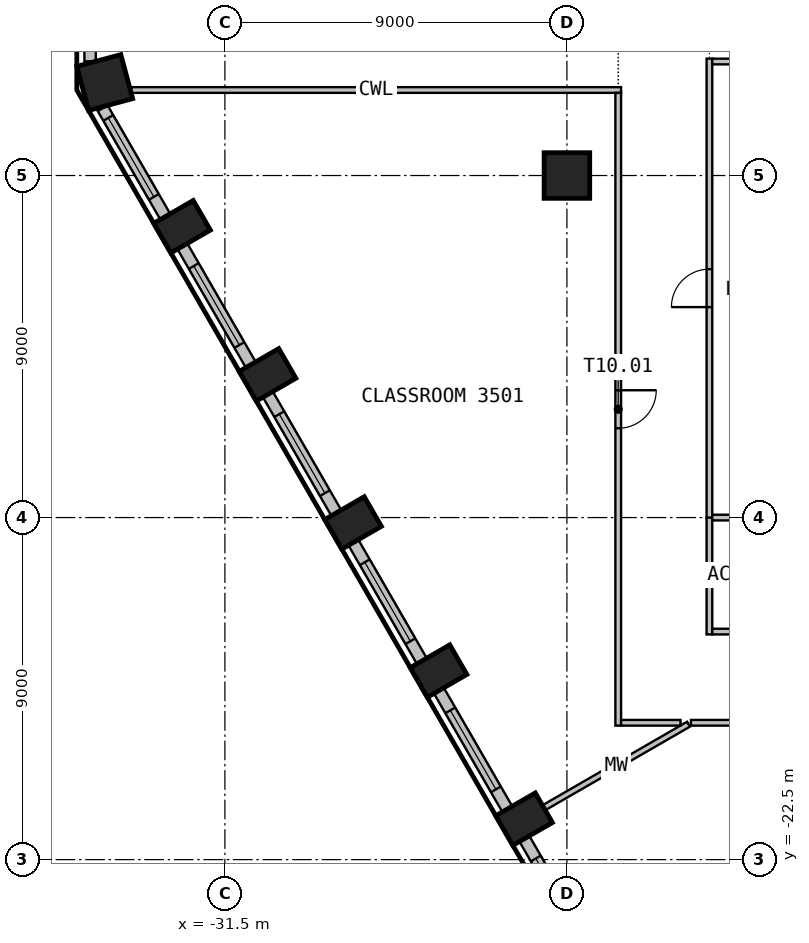
"""IFC4 building model, lengths in metres.
Left out: names, types, materials, properties, quantities, classifications, styles, units other than length and angle.
Written with IfcOpenShell. Run it as: python <this file> out.ifc"""

import sys

from ifc_helpers import new_model, si_unit, direction, frame, frame_2d, origin, origin_2d, place, context, subcontext, project, spatial, rectangle, circle, extrude, element, fill, save


model = new_model("IFC4")
c1 = context("Model", 3, precision=1e-05, world=origin(), true_north=direction((0.0, 1.0)))
c2 = subcontext(c1, "Body", "Model", "MODEL_VIEW")
j1 = project(units=[si_unit("LENGTHUNIT", "METRE"), si_unit("PLANEANGLEUNIT", "RADIAN")], contexts=[c1])
p1 = place(None, origin())
s1 = spatial("IfcSite", under=j1, at=p1, CompositionType="ELEMENT")
p2 = place(p1, origin())
s2 = spatial("IfcBuilding", under=s1, at=p2, CompositionType="ELEMENT")
p3 = place(p2, frame((0.0, 0.0, 144.3)))
s3 = spatial("IfcBuildingStorey", under=s2, at=p3, CompositionType="ELEMENT", Elevation=144.3)
p4 = place(p3, frame((-34.662, -2.053, 0.0), z_axis=(0.0, 0.0, 1.0), x_axis=(0.258819045103, -0.965925826289, 0.0)))
e1 = element("IfcColumn", 1, at=p4, inside=s3, PredefinedType="COLUMN", context=c2, shape_type="SweptSolid", body=[
    extrude(rectangle(XDim=1.2, YDim=1.2, at=origin_2d()), origin(), (0.0, 0.0, 1.0), 3.575),
])
for number, where, z_axis, x_axis in (
    (2, (-32.627, -5.847, 0.0), (0.0, 0.0, 1.0), (0.5, -0.866, 0.0)),
    (3, (-30.377, -9.744, 0.0), (0.0, 0.0, 1.0), (0.5, -0.866, 0.0)),
    (4, (-28.127, -13.641, 0.0), (0.0, 0.0, 1.0), (0.5, -0.866, 0.0)),
    (5, (-25.877, -17.539, 0.0), (0.0, 0.0, 1.0), (0.5, -0.866, 0.0)),
    (6, (-23.627, -21.436, 0.0), (0.0, 0.0, 1.0), (0.5, -0.866, 0.0)),
):
    element("IfcColumn", number, at=place(p3, frame(where, z_axis=z_axis, x_axis=x_axis)), inside=s3, PredefinedType="COLUMN", context=c2, shape_type="SweptSolid", body=[
        extrude(rectangle(XDim=0.9, YDim=1.2, at=origin_2d()), origin(), (0.0, 0.0, 1.0), 3.575),
    ])
p5 = place(p3, frame((-22.5, -4.5, 0.0), z_axis=(0.0, 0.0, 1.0), x_axis=(1.0, 0.0, 0.0)))
e7 = element("IfcColumn", 7, at=p5, inside=s3, PredefinedType="COLUMN", context=c2, shape_type="SweptSolid", body=[
    extrude(circle(Radius=0.6, at=origin_2d()), origin(), (0.0, 0.0, 1.0), 3.575),
])
p6 = place(p3, frame((-35.047, 1.495, 0.0), z_axis=(0.0, 0.0, 1.0), x_axis=(0.0, -1.0, 0.0)))
e8 = element("IfcWall", 8, at=p6, inside=s3, PredefinedType="SOLIDWALL", context=c2, shape_type="SweptSolid", body=[
    extrude(rectangle(XDim=2.989, YDim=0.3, at=frame_2d((1.495, 0.0))), origin(), (0.0, 0.0, 1.0), 3.575),
])
p7 = place(p6, frame((0.295, 0.0, 0.9)))
e9 = element("IfcOpeningElement", 9, at=p7, cuts=e8, PredefinedType="OPENING", context=c2, shape_type="SweptSolid", body=[
    extrude(rectangle(XDim=2.4, YDim=2.1, at=frame_2d((1.2, 1.05))), frame((0.0, 0.16, 0.0), z_axis=(0.0, -1.0, 0.0), x_axis=(1.0, 0.0, 0.0)), (0.0, 0.0, 1.0), 0.32),
])
p8 = place(p3, frame((-34.716, -2.729, 0.0), z_axis=(0.0, 0.0, 1.0), x_axis=(0.499981217486, -0.866036247602, 0.0)))
e10 = element("IfcWall", 10, at=p8, inside=s3, PredefinedType="SOLIDWALL", context=c2, shape_type="SweptSolid", body=[
    extrude(rectangle(XDim=3.294, YDim=0.3, at=frame_2d((1.647, 0.0))), origin(), (0.0, 0.0, 1.0), 3.575),
])
p9 = place(p8, frame((0.295, 0.0, 0.9)))
e11 = element("IfcOpeningElement", 11, at=p9, cuts=e10, PredefinedType="OPENING", context=c2, shape_type="SweptSolid", body=[
    extrude(rectangle(XDim=2.4, YDim=2.1, at=frame_2d((1.2, 1.05))), frame((0.0, 0.16, 0.0), z_axis=(0.0, -1.0, 0.0), x_axis=(1.0, 0.0, 0.0)), (0.0, 0.0, 1.0), 0.32),
])
p10 = place(p3, frame((-32.619, -6.362, 0.0), z_axis=(0.0, 0.0, 1.0), x_axis=(0.500027802648, -0.866009351323, 0.0)))
e12 = element("IfcWall", 12, at=p10, inside=s3, PredefinedType="SOLIDWALL", context=c2, shape_type="SweptSolid", body=[
    extrude(rectangle(XDim=3.599, YDim=0.3, at=frame_2d((1.799, 0.0))), origin(), (0.0, 0.0, 1.0), 3.575),
])
p11 = place(p10, frame((0.6, 0.0, 0.9)))
e13 = element("IfcOpeningElement", 13, at=p11, cuts=e12, PredefinedType="OPENING", context=c2, shape_type="SweptSolid", body=[
    extrude(rectangle(XDim=2.4, YDim=2.1, at=frame_2d((1.2, 1.05))), frame((0.0, 0.16, 0.0), z_axis=(0.0, -1.0, 0.0), x_axis=(1.0, 0.0, 0.0)), (0.0, 0.0, 1.0), 0.32),
])
p12 = place(p3, frame((-30.369, -10.26, 0.0), z_axis=(0.0, 0.0, 1.0), x_axis=(0.500027802648, -0.866009351323, 0.0)))
e14 = element("IfcWall", 14, at=p12, inside=s3, PredefinedType="SOLIDWALL", context=c2, shape_type="SweptSolid", body=[
    extrude(rectangle(XDim=3.599, YDim=0.3, at=frame_2d((1.799, 0.0))), origin(), (0.0, 0.0, 1.0), 3.575),
])
p13 = place(p12, frame((0.6, 0.0, 0.9)))
e15 = element("IfcOpeningElement", 15, at=p13, cuts=e14, PredefinedType="OPENING", context=c2, shape_type="SweptSolid", body=[
    extrude(rectangle(XDim=2.4, YDim=2.1, at=frame_2d((1.2, 1.05))), frame((0.0, 0.16, 0.0), z_axis=(0.0, -1.0, 0.0), x_axis=(1.0, 0.0, 0.0)), (0.0, 0.0, 1.0), 0.32),
])
p14 = place(p3, frame((-28.119, -14.156, 0.0), z_axis=(0.0, 0.0, 1.0), x_axis=(0.500027802648, -0.866009351323, 0.0)))
e16 = element("IfcWall", 16, at=p14, inside=s3, PredefinedType="SOLIDWALL", context=c2, shape_type="SweptSolid", body=[
    extrude(rectangle(XDim=3.599, YDim=0.3, at=frame_2d((1.799, 0.0))), origin(), (0.0, 0.0, 1.0), 3.575),
])
p15 = place(p14, frame((0.6, 0.0, 0.9)))
e17 = element("IfcOpeningElement", 17, at=p15, cuts=e16, PredefinedType="OPENING", context=c2, shape_type="SweptSolid", body=[
    extrude(rectangle(XDim=2.4, YDim=2.1, at=frame_2d((1.2, 1.05))), frame((0.0, 0.16, 0.0), z_axis=(0.0, -1.0, 0.0), x_axis=(1.0, 0.0, 0.0)), (0.0, 0.0, 1.0), 0.32),
])
p16 = place(p3, frame((-25.869, -18.054, 0.0), z_axis=(0.0, 0.0, 1.0), x_axis=(0.500027802648, -0.866009351323, 0.0)))
e18 = element("IfcWall", 18, at=p16, inside=s3, PredefinedType="SOLIDWALL", context=c2, shape_type="SweptSolid", body=[
    extrude(rectangle(XDim=3.599, YDim=0.3, at=frame_2d((1.799, 0.0))), origin(), (0.0, 0.0, 1.0), 3.575),
])
p17 = place(p16, frame((0.6, 0.0, 0.9)))
e19 = element("IfcOpeningElement", 19, at=p17, cuts=e18, PredefinedType="OPENING", context=c2, shape_type="SweptSolid", body=[
    extrude(rectangle(XDim=2.4, YDim=2.1, at=frame_2d((1.2, 1.05))), frame((0.0, 0.16, 0.0), z_axis=(0.0, -1.0, 0.0), x_axis=(1.0, 0.0, 0.0)), (0.0, 0.0, 1.0), 0.32),
])
p18 = place(p3, frame((-23.619, -21.951, 0.0), z_axis=(0.0, 0.0, 1.0), x_axis=(0.500036802197, -0.866004154983, 0.0)))
e20 = element("IfcWall", 20, at=p18, inside=s3, PredefinedType="SOLIDWALL", context=c2, shape_type="SweptSolid", body=[
    extrude(rectangle(XDim=3.294, YDim=0.3, at=frame_2d((1.647, 0.0))), origin(), (0.0, 0.0, 1.0), 3.575),
])
p19 = place(p18, frame((0.6, 0.0, 0.9)))
e21 = element("IfcOpeningElement", 21, at=p19, cuts=e20, PredefinedType="OPENING", context=c2, shape_type="SweptSolid", body=[
    extrude(rectangle(XDim=2.4, YDim=2.1, at=frame_2d((1.2, 1.05))), frame((0.0, 0.16, 0.0), z_axis=(0.0, -1.0, 0.0), x_axis=(1.0, 0.0, 0.0)), (0.0, 0.0, 1.0), 0.32),
])
p20 = place(p3, frame((-21.075, -2.25, 0.0), z_axis=(0.0, 0.0, 1.0), x_axis=(-1.0, 0.0, 0.0)))
e22 = element("IfcWall", 22, at=p20, inside=s3, PredefinedType="PARTITIONING", context=c2, shape_type="SweptSolid", body=[
    extrude(rectangle(XDim=12.893, YDim=0.15, at=frame_2d((6.446, 0.0))), origin(), (0.0, 0.0, 1.0), 3.575),
])
p21 = place(p3, frame((-19.301, -18.938, 0.0), z_axis=(0.0, 0.0, 1.0), x_axis=(-0.865968165673, -0.500099126214, 0.0)))
e23 = element("IfcWall", 23, at=p21, inside=s3, PredefinedType="MOVABLE", context=c2, shape_type="SweptSolid", body=[
    extrude(rectangle(XDim=4.376, YDim=0.15, at=frame_2d((2.188, 0.0))), origin(), (0.0, 0.0, 1.0), 3.575),
])
p22 = place(p3, frame((-21.15, -2.325, 0.0), z_axis=(0.0, 0.0, 1.0), x_axis=(0.0, -1.0, 0.0)))
e24 = element("IfcWall", 24, at=p22, inside=s3, PredefinedType="PARTITIONING", context=c2, shape_type="SweptSolid", body=[
    extrude(rectangle(XDim=16.65, YDim=0.15, at=frame_2d((8.325, 0.0))), origin(), (0.0, 0.0, 1.0), 3.575),
])
p23 = place(p22, frame((7.825, 0.0, 0.0)))
e25 = element("IfcOpeningElement", 25, at=p23, cuts=e24, PredefinedType="OPENING", context=c2, shape_type="SweptSolid", body=[
    extrude(rectangle(XDim=1.0, YDim=2.1, at=frame_2d((0.5, 1.05))), frame((0.0, 0.085, 0.0), z_axis=(0.0, -1.0, 0.0), x_axis=(1.0, 0.0, 0.0)), (0.0, 0.0, 1.0), 0.17),
])
p24 = place(p3, frame((-21.075, -18.9, 0.0), z_axis=(0.0, 0.0, 1.0), x_axis=(1.0, 0.0, 0.0)))
e26 = element("IfcWall", 26, at=p24, inside=s3, PredefinedType="PARTITIONING", context=c2, shape_type="SweptSolid", body=[
    extrude(rectangle(XDim=1.564, YDim=0.15, at=frame_2d((0.782, 0.0))), origin(), (0.0, 0.0, 1.0), 3.575),
])
p25 = place(p3, frame((-19.236, -18.9, 0.0), z_axis=(0.0, 0.0, 1.0), x_axis=(1.0, 0.0, 0.0)))
e27 = element("IfcWall", 27, at=p25, inside=s3, PredefinedType="PARTITIONING", context=c2, shape_type="SweptSolid", body=[
    extrude(rectangle(XDim=5.736, YDim=0.15, at=frame_2d((2.868, 0.0))), origin(), (0.0, 0.0, 1.0), 3.575),
])
p26 = place(p25, frame((2.368, 0.0, 0.0)))
e28 = element("IfcOpeningElement", 28, at=p26, cuts=e27, PredefinedType="OPENING", context=c2, shape_type="SweptSolid", body=[
    extrude(rectangle(XDim=1.0, YDim=2.1, at=frame_2d((0.5, 1.05))), frame((0.0, 0.085, 0.0), z_axis=(0.0, -1.0, 0.0), x_axis=(1.0, 0.0, 0.0)), (0.0, 0.0, 1.0), 0.17),
])
p27 = place(p3, frame((-18.75, -16.575, 0.0), z_axis=(0.0, 0.0, 1.0), x_axis=(0.0, 1.0, 0.0)))
e29 = element("IfcWall", 29, at=p27, inside=s3, PredefinedType="PARTITIONING", context=c2, shape_type="SweptSolid", body=[
    extrude(rectangle(XDim=3.075, YDim=0.15, at=frame_2d((1.538, 0.0))), origin(), (0.0, 0.0, 1.0), 3.575),
])
p28 = place(p3, frame((-13.275, -16.5, 0.0), z_axis=(0.0, 0.0, 1.0), x_axis=(-1.0, 0.0, 0.0)))
e30 = element("IfcWall", 30, at=p28, inside=s3, PredefinedType="PARTITIONING", context=c2, shape_type="SweptSolid", body=[
    extrude(rectangle(XDim=5.4, YDim=0.15, at=frame_2d((2.7, 0.0))), origin(), (0.0, 0.0, 1.0), 3.575),
])
p29 = place(p28, frame((2.2, 0.0, 0.0)))
e31 = element("IfcOpeningElement", 31, at=p29, cuts=e30, PredefinedType="OPENING", context=c2, shape_type="SweptSolid", body=[
    extrude(rectangle(XDim=1.0, YDim=2.1, at=frame_2d((0.5, 1.05))), frame((0.0, 0.085, 0.0), z_axis=(0.0, -1.0, 0.0), x_axis=(1.0, 0.0, 0.0)), (0.0, 0.0, 1.0), 0.17),
])
p30 = place(p3, frame((-18.75, -13.5, 0.0), z_axis=(0.0, 0.0, 1.0), x_axis=(0.0, 1.0, 0.0)))
e32 = element("IfcWall", 32, at=p30, inside=s3, PredefinedType="PARTITIONING", context=c2, shape_type="SweptSolid", body=[
    extrude(rectangle(XDim=12.075, YDim=0.15, at=frame_2d((6.038, 0.0))), origin(), (0.0, 0.0, 1.0), 3.575),
])
p31 = place(p30, frame((5.538, 0.0, 0.0)))
e33 = element("IfcOpeningElement", 33, at=p31, cuts=e32, PredefinedType="OPENING", context=c2, shape_type="SweptSolid", body=[
    extrude(rectangle(XDim=1.0, YDim=2.1, at=frame_2d((0.5, 1.05))), frame((0.0, 0.085, 0.0), z_axis=(0.0, -1.0, 0.0), x_axis=(1.0, 0.0, 0.0)), (0.0, 0.0, 1.0), 0.17),
])
for number, where, z_axis, x_axis in (
    (34, (-15.75, -13.5, 0.0), (0.0, 0.0, 1.0), (-1.0, 0.0, 0.0)),
    (35, (-18.675, -1.5, 0.0), (0.0, 0.0, 1.0), (1.0, 0.0, 0.0)),
):
    element("IfcWall", number, at=place(p3, frame(where, z_axis=z_axis, x_axis=x_axis)), inside=s3, PredefinedType="PARTITIONING", context=c2, shape_type="SweptSolid", body=[
        extrude(rectangle(XDim=2.925, YDim=0.15, at=frame_2d((1.462, 0.0))), origin(), (0.0, 0.0, 1.0), 3.575),
    ])
p32 = place(p9, origin())
e36 = element("IfcWindow", 36, at=p32, inside=s3, PartitioningType="SINGLE_PANEL", PredefinedType="WINDOW", context=c2, shape_type="SweptSolid", body=[
    extrude(rectangle(XDim=2.4, YDim=2.1, at=frame_2d((1.2, 1.05))), frame((0.0, 0.03, 0.0), z_axis=(0.0, -1.0, 0.0), x_axis=(1.0, 0.0, 0.0)), (0.0, 0.0, 1.0), 0.06),
])
fill(e11, e36)
p33 = place(p11, origin())
e37 = element("IfcWindow", 37, at=p33, inside=s3, PartitioningType="SINGLE_PANEL", PredefinedType="WINDOW", context=c2, shape_type="SweptSolid", body=[
    extrude(rectangle(XDim=2.4, YDim=2.1, at=frame_2d((1.2, 1.05))), frame((0.0, 0.03, 0.0), z_axis=(0.0, -1.0, 0.0), x_axis=(1.0, 0.0, 0.0)), (0.0, 0.0, 1.0), 0.06),
])
fill(e13, e37)
p34 = place(p13, origin())
e38 = element("IfcWindow", 38, at=p34, inside=s3, PartitioningType="SINGLE_PANEL", PredefinedType="WINDOW", context=c2, shape_type="SweptSolid", body=[
    extrude(rectangle(XDim=2.4, YDim=2.1, at=frame_2d((1.2, 1.05))), frame((0.0, 0.03, 0.0), z_axis=(0.0, -1.0, 0.0), x_axis=(1.0, 0.0, 0.0)), (0.0, 0.0, 1.0), 0.06),
])
fill(e15, e38)
p35 = place(p15, origin())
e39 = element("IfcWindow", 39, at=p35, inside=s3, PartitioningType="SINGLE_PANEL", PredefinedType="WINDOW", context=c2, shape_type="SweptSolid", body=[
    extrude(rectangle(XDim=2.4, YDim=2.1, at=frame_2d((1.2, 1.05))), frame((0.0, 0.03, 0.0), z_axis=(0.0, -1.0, 0.0), x_axis=(1.0, 0.0, 0.0)), (0.0, 0.0, 1.0), 0.06),
])
fill(e17, e39)
p36 = place(p17, origin())
e40 = element("IfcWindow", 40, at=p36, inside=s3, PartitioningType="SINGLE_PANEL", PredefinedType="WINDOW", context=c2, shape_type="SweptSolid", body=[
    extrude(rectangle(XDim=2.4, YDim=2.1, at=frame_2d((1.2, 1.05))), frame((0.0, 0.03, 0.0), z_axis=(0.0, -1.0, 0.0), x_axis=(1.0, 0.0, 0.0)), (0.0, 0.0, 1.0), 0.06),
])
fill(e19, e40)
p37 = place(p19, origin())
e41 = element("IfcWindow", 41, at=p37, inside=s3, PartitioningType="SINGLE_PANEL", PredefinedType="WINDOW", context=c2, shape_type="SweptSolid", body=[
    extrude(rectangle(XDim=2.4, YDim=2.1, at=frame_2d((1.2, 1.05))), frame((0.0, 0.03, 0.0), z_axis=(0.0, -1.0, 0.0), x_axis=(1.0, 0.0, 0.0)), (0.0, 0.0, 1.0), 0.06),
])
fill(e21, e41)
p38 = place(p23, origin())
e42 = element("IfcDoor", 42, at=p38, inside=s3, OperationType="SINGLE_SWING_RIGHT", PredefinedType="DOOR", context=c2, shape_type="SweptSolid", body=[
    extrude(rectangle(XDim=1.0, YDim=2.1, at=frame_2d((0.5, 1.05))), frame((0.0, 0.025, 0.0), z_axis=(0.0, -1.0, 0.0), x_axis=(1.0, 0.0, 0.0)), (0.0, 0.0, 1.0), 0.05),
])
fill(e25, e42)
p39 = place(p31, origin())
e43 = element("IfcDoor", 43, at=p39, inside=s3, OperationType="SINGLE_SWING_LEFT", PredefinedType="DOOR", context=c2, shape_type="SweptSolid", body=[
    extrude(rectangle(XDim=1.0, YDim=2.1, at=frame_2d((0.5, 1.05))), frame((0.0, 0.025, 0.0), z_axis=(0.0, -1.0, 0.0), x_axis=(1.0, 0.0, 0.0)), (0.0, 0.0, 1.0), 0.05),
])
fill(e33, e43)
save(model, sys.argv[1])
